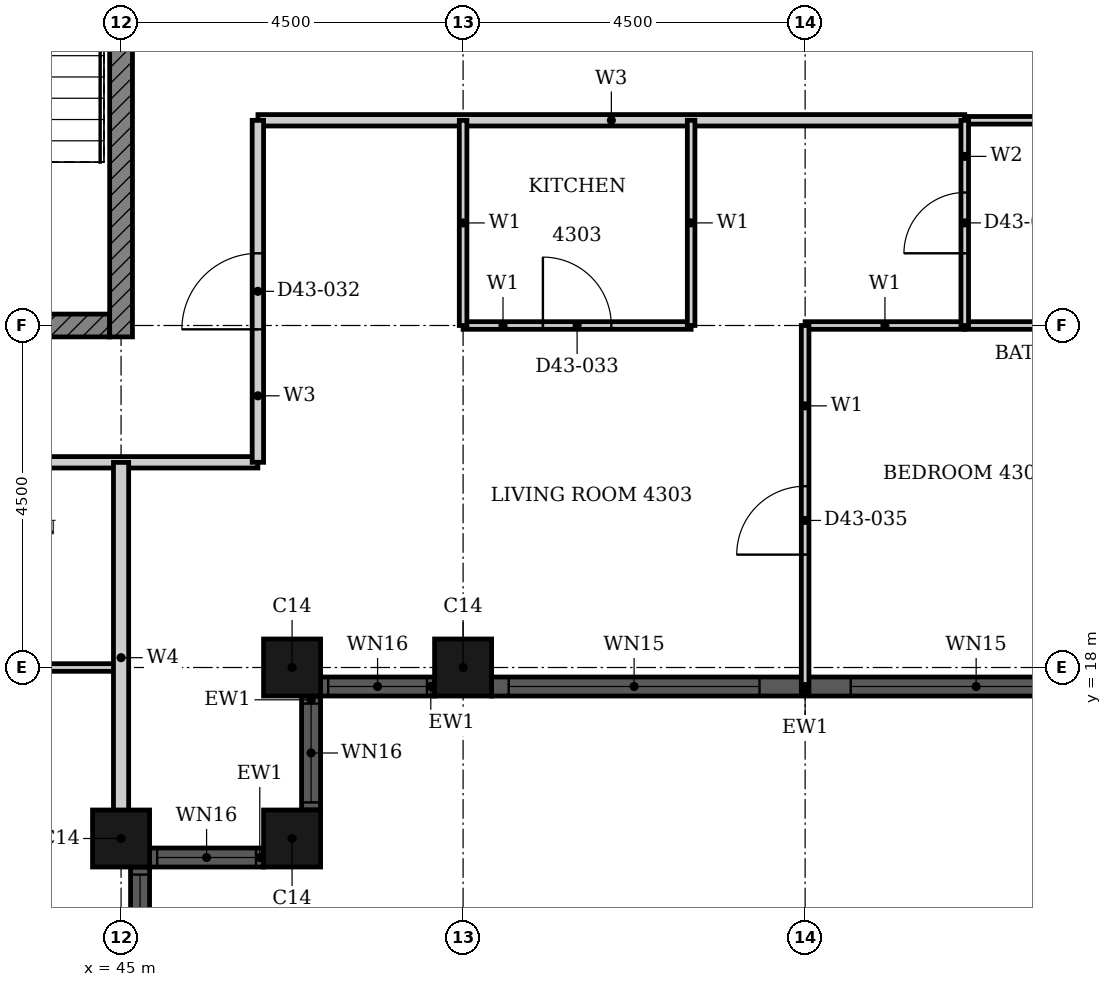
"""IFC4 building model, lengths in metres.
Left out: names, types, materials, properties, quantities, classifications, styles, units other than length and angle.
Written with IfcOpenShell. Run it as: python <this file> out.ifc"""

import sys

from ifc_helpers import new_model, si_unit, direction, frame, frame_2d, origin, origin_2d, place, context, subcontext, project, spatial, rectangle, hollow_rectangle, extrude, element, fill, save


model = new_model("IFC4")
c1 = context("Model", 3, precision=1e-05, world=origin(), true_north=direction((0.0, 1.0)))
c2 = subcontext(c1, "Body", "Model", "MODEL_VIEW")
j1 = project(units=[si_unit("LENGTHUNIT", "METRE"), si_unit("PLANEANGLEUNIT", "RADIAN")], contexts=[c1])
p1 = place(None, origin())
s1 = spatial("IfcSite", under=j1, at=p1, CompositionType="ELEMENT")
p2 = place(p1, origin())
s2 = spatial("IfcBuilding", under=s1, at=p2, CompositionType="ELEMENT")
p3 = place(p2, frame((0.0, 0.0, 172.8)))
s3 = spatial("IfcBuildingStorey", under=s2, at=p3, CompositionType="ELEMENT", Elevation=172.8)
for number, where, z_axis, x_axis in (
    (1, (45.0, 15.75, 0.0), (0.0, 0.0, 1.0), (1.0, 0.0, 0.0)),
    (2, (47.25, 15.75, 0.0), (0.0, 0.0, 1.0), (1.0, 0.0, 0.0)),
    (3, (47.25, 18.0, 0.0), (0.0, 0.0, 1.0), (1.0, 0.0, 0.0)),
    (4, (49.5, 18.0, 0.0), (0.0, 0.0, 1.0), (1.0, 0.0, 0.0)),
):
    element("IfcColumn", number, at=place(p3, frame(where, z_axis=z_axis, x_axis=x_axis)), inside=s3, PredefinedType="COLUMN", context=c2, shape_type="SweptSolid", body=[
        extrude(hollow_rectangle(XDim=0.75, YDim=0.75, WallThickness=0.024, at=origin_2d()), origin(), (0.0, 0.0, 1.0), 3.7),
    ])
p4 = place(p3, frame((45.25, 13.875, 0.0), z_axis=(0.0, 0.0, 1.0), x_axis=(0.0, 1.0, 0.0)))
e5 = element("IfcWall", 5, at=p4, inside=s3, PredefinedType="SOLIDWALL", context=c2, shape_type="SweptSolid", body=[
    extrude(rectangle(XDim=1.5, YDim=0.25, at=frame_2d((0.75, 0.0))), origin(), (0.0, 0.0, 1.0), 3.7),
])
p5 = place(p4, frame((0.1, 0.0, 0.9)))
e6 = element("IfcOpeningElement", 6, at=p5, cuts=e5, PredefinedType="OPENING", context=c2, shape_type="SweptSolid", body=[
    extrude(rectangle(XDim=1.3, YDim=1.85, at=frame_2d((0.65, 0.925))), frame((0.0, 0.135, 0.0), z_axis=(0.0, -1.0, 0.0), x_axis=(1.0, 0.0, 0.0)), (0.0, 0.0, 1.0), 0.27),
])
p6 = place(p3, frame((45.375, 15.5, 0.0), z_axis=(0.0, 0.0, 1.0), x_axis=(1.0, 0.0, 0.0)))
e7 = element("IfcWall", 7, at=p6, inside=s3, PredefinedType="SOLIDWALL", context=c2, shape_type="SweptSolid", body=[
    extrude(rectangle(XDim=1.5, YDim=0.25, at=frame_2d((0.75, 0.0))), origin(), (0.0, 0.0, 1.0), 3.7),
])
p7 = place(p6, frame((0.1, 0.0, 0.9)))
e8 = element("IfcOpeningElement", 8, at=p7, cuts=e7, PredefinedType="OPENING", context=c2, shape_type="SweptSolid", body=[
    extrude(rectangle(XDim=1.3, YDim=1.85, at=frame_2d((0.65, 0.925))), frame((0.0, 0.135, 0.0), z_axis=(0.0, -1.0, 0.0), x_axis=(1.0, 0.0, 0.0)), (0.0, 0.0, 1.0), 0.27),
])
p8 = place(p3, frame((47.5, 16.125, 0.0), z_axis=(0.0, 0.0, 1.0), x_axis=(0.0, 1.0, 0.0)))
e9 = element("IfcWall", 9, at=p8, inside=s3, PredefinedType="SOLIDWALL", context=c2, shape_type="SweptSolid", body=[
    extrude(rectangle(XDim=1.5, YDim=0.25, at=frame_2d((0.75, 0.0))), origin(), (0.0, 0.0, 1.0), 3.7),
])
p9 = place(p8, frame((0.1, 0.0, 0.9)))
e10 = element("IfcOpeningElement", 10, at=p9, cuts=e9, PredefinedType="OPENING", context=c2, shape_type="SweptSolid", body=[
    extrude(rectangle(XDim=1.3, YDim=1.85, at=frame_2d((0.65, 0.925))), frame((0.0, 0.135, 0.0), z_axis=(0.0, -1.0, 0.0), x_axis=(1.0, 0.0, 0.0)), (0.0, 0.0, 1.0), 0.27),
])
p10 = place(p3, frame((47.625, 17.75, 0.0), z_axis=(0.0, 0.0, 1.0), x_axis=(1.0, 0.0, 0.0)))
e11 = element("IfcWall", 11, at=p10, inside=s3, PredefinedType="SOLIDWALL", context=c2, shape_type="SweptSolid", body=[
    extrude(rectangle(XDim=1.5, YDim=0.25, at=frame_2d((0.75, 0.0))), origin(), (0.0, 0.0, 1.0), 3.7),
])
p11 = place(p10, frame((0.1, 0.0, 0.9)))
e12 = element("IfcOpeningElement", 12, at=p11, cuts=e11, PredefinedType="OPENING", context=c2, shape_type="SweptSolid", body=[
    extrude(rectangle(XDim=1.3, YDim=1.85, at=frame_2d((0.65, 0.925))), frame((0.0, 0.135, 0.0), z_axis=(0.0, -1.0, 0.0), x_axis=(1.0, 0.0, 0.0)), (0.0, 0.0, 1.0), 0.27),
])
p12 = place(p3, frame((49.875, 17.75, 0.0), z_axis=(0.0, 0.0, 1.0), x_axis=(1.0, 0.0, 0.0)))
e13 = element("IfcWall", 13, at=p12, inside=s3, PredefinedType="SOLIDWALL", context=c2, shape_type="SweptSolid", body=[
    extrude(rectangle(XDim=8.25, YDim=0.25, at=frame_2d((4.125, 0.0))), origin(), (0.0, 0.0, 1.0), 3.7),
])
p13 = place(p12, frame((0.225, 0.0, 0.45)))
e14 = element("IfcOpeningElement", 14, at=p13, cuts=e13, PredefinedType="OPENING", context=c2, shape_type="SweptSolid", body=[
    extrude(rectangle(XDim=3.3, YDim=2.3, at=frame_2d((1.65, 1.15))), frame((0.0, 0.135, 0.0), z_axis=(0.0, -1.0, 0.0), x_axis=(1.0, 0.0, 0.0)), (0.0, 0.0, 1.0), 0.27),
])
p14 = place(p12, frame((4.725, 0.0, 0.45)))
e15 = element("IfcOpeningElement", 15, at=p14, cuts=e13, PredefinedType="OPENING", context=c2, shape_type="SweptSolid", body=[
    extrude(rectangle(XDim=3.3, YDim=2.3, at=frame_2d((1.65, 1.15))), frame((0.0, 0.135, 0.0), z_axis=(0.0, -1.0, 0.0), x_axis=(1.0, 0.0, 0.0)), (0.0, 0.0, 1.0), 0.27),
])
p15 = place(p3, frame((32.911, 22.5, 0.0), z_axis=(0.0, 0.0, 1.0), x_axis=(1.0, 0.0, 0.0)))
e16 = element("IfcWall", 16, at=p15, inside=s3, PredefinedType="SHEAR", context=c2, shape_type="SweptSolid", body=[
    extrude(rectangle(XDim=11.939, YDim=0.3, at=frame_2d((5.97, 0.0))), origin(), (0.0, 0.0, 1.0), 3.4),
])
p16 = place(p15, frame((5.404, 0.0, 0.0)))
e17 = element("IfcOpeningElement", 17, at=p16, cuts=e16, PredefinedType="OPENING", context=c2, shape_type="SweptSolid", body=[
    extrude(rectangle(XDim=1.8, YDim=2.1, at=frame_2d((0.9, 1.05))), frame((0.0, 0.16, 0.0), z_axis=(0.0, -1.0, 0.0), x_axis=(1.0, 0.0, 0.0)), (0.0, 0.0, 1.0), 0.32),
])
p17 = place(p3, frame((45.0, 22.35, 0.0), z_axis=(0.0, 0.0, 1.0), x_axis=(0.0, 1.0, 0.0)))
e18 = element("IfcWall", 18, at=p17, inside=s3, PredefinedType="SHEAR", context=c2, shape_type="SweptSolid", body=[
    extrude(rectangle(XDim=9.3, YDim=0.3, at=frame_2d((4.65, 0.0))), origin(), (0.0, 0.0, 1.0), 3.4),
])
p18 = place(p3, frame((38.4, 20.7, 0.0), z_axis=(0.0, 0.0, 1.0), x_axis=(1.0, 0.0, 0.0)))
e19 = element("IfcWall", 19, at=p18, inside=s3, PredefinedType="PARTITIONING", context=c2, shape_type="SweptSolid", body=[
    extrude(rectangle(XDim=8.4, YDim=0.15, at=frame_2d((4.2, 0.0))), origin(), (0.0, 0.0, 1.0), 3.4),
])
p19 = place(p3, frame((46.801, 25.2, 0.0), z_axis=(0.0, 0.0, 1.0), x_axis=(1.0, 0.0, 0.0)))
e20 = element("IfcWall", 20, at=p19, inside=s3, PredefinedType="PARTITIONING", context=c2, shape_type="SweptSolid", body=[
    extrude(rectangle(XDim=9.299, YDim=0.15, at=frame_2d((4.649, 0.0))), origin(), (0.0, 0.0, 1.0), 3.4),
])
p20 = place(p3, frame((46.8, 20.7, 0.0), z_axis=(0.0, 0.0, 1.0), x_axis=(0.0, 1.0, 0.0)))
e21 = element("IfcWall", 21, at=p20, inside=s3, PredefinedType="PARTITIONING", context=c2, shape_type="SweptSolid", body=[
    extrude(rectangle(XDim=4.499, YDim=0.15, at=frame_2d((2.25, 0.0))), origin(), (0.0, 0.0, 1.0), 3.4),
])
p21 = place(p20, frame((1.75, 0.0, 0.0)))
e22 = element("IfcOpeningElement", 22, at=p21, cuts=e21, PredefinedType="OPENING", context=c2, shape_type="SweptSolid", body=[
    extrude(rectangle(XDim=1.0, YDim=2.2, at=frame_2d((0.5, 1.1))), frame((0.0, 0.085, 0.0), z_axis=(0.0, -1.0, 0.0), x_axis=(1.0, 0.0, 0.0)), (0.0, 0.0, 1.0), 0.17),
])
p22 = place(p3, frame((42.0, 18.0, 0.0), z_axis=(0.0, 0.0, 1.0), x_axis=(1.0, 0.0, 0.0)))
e23 = element("IfcWall", 23, at=p22, inside=s3, PredefinedType="PARTITIONING", context=c2, shape_type="SweptSolid", body=[
    extrude(rectangle(XDim=3.0, YDim=0.1, at=frame_2d((1.5, 0.0))), origin(), (0.0, 0.0, 1.0), 3.4),
])
p23 = place(p22, frame((1.05, 0.0, 0.0)))
e24 = element("IfcOpeningElement", 24, at=p23, cuts=e23, PredefinedType="OPENING", context=c2, shape_type="SweptSolid", body=[
    extrude(rectangle(XDim=0.9, YDim=2.1, at=frame_2d((0.45, 1.05))), frame((0.0, 0.06, 0.0), z_axis=(0.0, -1.0, 0.0), x_axis=(1.0, 0.0, 0.0)), (0.0, 0.0, 1.0), 0.12),
])
p24 = place(p3, frame((54.0, 22.5, 0.0), z_axis=(0.0, 0.0, 1.0), x_axis=(1.0, 0.0, 0.0)))
e25 = element("IfcWall", 25, at=p24, inside=s3, PredefinedType="PARTITIONING", context=c2, shape_type="SweptSolid", body=[
    extrude(rectangle(XDim=2.1, YDim=0.1, at=frame_2d((1.05, 0.0))), origin(), (0.0, 0.0, 1.0), 2.68),
])
p25 = place(p3, frame((49.5, 22.5, 0.0), z_axis=(0.0, 0.0, 1.0), x_axis=(1.0, 0.0, 0.0)))
e26 = element("IfcWall", 26, at=p25, inside=s3, PredefinedType="PARTITIONING", context=c2, shape_type="SweptSolid", body=[
    extrude(rectangle(XDim=3.0, YDim=0.1, at=frame_2d((1.5, 0.0))), origin(), (0.0, 0.0, 1.0), 2.68),
])
p26 = place(p25, frame((1.05, 0.0, 0.0)))
e27 = element("IfcOpeningElement", 27, at=p26, cuts=e26, PredefinedType="OPENING", context=c2, shape_type="SweptSolid", body=[
    extrude(rectangle(XDim=0.9, YDim=2.1, at=frame_2d((0.45, 1.05))), frame((0.0, 0.06, 0.0), z_axis=(0.0, -1.0, 0.0), x_axis=(1.0, 0.0, 0.0)), (0.0, 0.0, 1.0), 0.12),
])
p27 = place(p3, frame((49.5, 22.5, 0.0), z_axis=(0.0, 0.0, 1.0), x_axis=(0.0, 1.0, 0.0)))
e28 = element("IfcWall", 28, at=p27, inside=s3, PredefinedType="PARTITIONING", context=c2, shape_type="SweptSolid", body=[
    extrude(rectangle(XDim=2.699, YDim=0.1, at=frame_2d((1.35, 0.0))), origin(), (0.0, 0.0, 1.0), 2.48),
])
p28 = place(p3, frame((52.5, 22.5, 0.0), z_axis=(0.0, 0.0, 1.0), x_axis=(0.0, 1.0, 0.0)))
e29 = element("IfcWall", 29, at=p28, inside=s3, PredefinedType="PARTITIONING", context=c2, shape_type="SweptSolid", body=[
    extrude(rectangle(XDim=2.7, YDim=0.1, at=frame_2d((1.35, 0.0))), origin(), (0.0, 0.0, 1.0), 3.4),
])
p29 = place(p3, frame((54.0, 17.685, 0.0), z_axis=(0.0, 0.0, 1.0), x_axis=(0.0, 1.0, 0.0)))
e30 = element("IfcWall", 30, at=p29, inside=s3, PredefinedType="PARTITIONING", context=c2, shape_type="SweptSolid", body=[
    extrude(rectangle(XDim=4.815, YDim=0.1, at=frame_2d((2.407, 0.0))), origin(), (0.0, 0.0, 1.0), 3.4),
])
p30 = place(p29, frame((1.8, 0.0, 0.0)))
e31 = element("IfcOpeningElement", 31, at=p30, cuts=e30, PredefinedType="OPENING", context=c2, shape_type="SweptSolid", body=[
    extrude(rectangle(XDim=0.9, YDim=2.1, at=frame_2d((0.45, 1.05))), frame((0.0, 0.06, 0.0), z_axis=(0.0, -1.0, 0.0), x_axis=(1.0, 0.0, 0.0)), (0.0, 0.0, 1.0), 0.12),
])
p31 = place(p3, frame((45.0, 15.56, 0.0), z_axis=(0.0, 0.0, 1.0), x_axis=(0.0, 1.0, 0.0)))
e32 = element("IfcWall", 32, at=p31, inside=s3, PredefinedType="PARTITIONING", context=c2, shape_type="SweptSolid", body=[
    extrude(rectangle(XDim=5.139, YDim=0.2, at=frame_2d((2.569, 0.0))), origin(), (0.0, 0.0, 1.0), 3.4),
])
p32 = place(p3, frame((56.1, 22.5, 0.0), z_axis=(0.0, 0.0, 1.0), x_axis=(1.0, 0.0, 0.0)))
e33 = element("IfcWall", 33, at=p32, inside=s3, PredefinedType="PARTITIONING", context=c2, shape_type="SweptSolid", body=[
    extrude(rectangle(XDim=2.4, YDim=0.1, at=frame_2d((1.2, 0.0))), origin(), (0.0, 0.0, 1.0), 2.68),
])
p33 = place(p3, frame((56.1, 25.2, 0.0), z_axis=(0.0, 0.0, 1.0), x_axis=(1.0, 0.0, 0.0)))
e34 = element("IfcWall", 34, at=p33, inside=s3, PredefinedType="PARTITIONING", context=c2, shape_type="SweptSolid", body=[
    extrude(rectangle(XDim=2.4, YDim=0.1, at=frame_2d((1.2, 0.0))), origin(), (0.0, 0.0, 1.0), 3.4),
])
p34 = place(p3, frame((56.1, 22.5, 0.0), z_axis=(0.0, 0.0, 1.0), x_axis=(0.0, 1.0, 0.0)))
e35 = element("IfcWall", 35, at=p34, inside=s3, PredefinedType="PARTITIONING", context=c2, shape_type="SweptSolid", body=[
    extrude(rectangle(XDim=2.7, YDim=0.1, at=frame_2d((1.35, 0.0))), origin(), (0.0, 0.0, 1.0), 3.4),
])
p35 = place(p34, frame((0.95, 0.0, 0.0)))
e36 = element("IfcOpeningElement", 36, at=p35, cuts=e35, PredefinedType="OPENING", context=c2, shape_type="SweptSolid", body=[
    extrude(rectangle(XDim=0.8, YDim=2.1, at=frame_2d((0.4, 1.05))), frame((0.0, 0.06, 0.0), z_axis=(0.0, -1.0, 0.0), x_axis=(1.0, 0.0, 0.0)), (0.0, 0.0, 1.0), 0.12),
])
p36 = place(p5, origin())
e37 = element("IfcWindow", 37, at=p36, inside=s3, PartitioningType="SINGLE_PANEL", PredefinedType="WINDOW", context=c2, shape_type="SweptSolid", body=[
    extrude(rectangle(XDim=1.3, YDim=1.85, at=frame_2d((0.65, 0.925))), frame((0.0, 0.03, 0.0), z_axis=(0.0, -1.0, 0.0), x_axis=(1.0, 0.0, 0.0)), (0.0, 0.0, 1.0), 0.06),
])
fill(e6, e37)
p37 = place(p7, origin())
e38 = element("IfcWindow", 38, at=p37, inside=s3, PartitioningType="SINGLE_PANEL", PredefinedType="WINDOW", context=c2, shape_type="SweptSolid", body=[
    extrude(rectangle(XDim=1.3, YDim=1.85, at=frame_2d((0.65, 0.925))), frame((0.0, 0.03, 0.0), z_axis=(0.0, -1.0, 0.0), x_axis=(1.0, 0.0, 0.0)), (0.0, 0.0, 1.0), 0.06),
])
fill(e8, e38)
p38 = place(p9, origin())
e39 = element("IfcWindow", 39, at=p38, inside=s3, PartitioningType="SINGLE_PANEL", PredefinedType="WINDOW", context=c2, shape_type="SweptSolid", body=[
    extrude(rectangle(XDim=1.3, YDim=1.85, at=frame_2d((0.65, 0.925))), frame((0.0, 0.03, 0.0), z_axis=(0.0, -1.0, 0.0), x_axis=(1.0, 0.0, 0.0)), (0.0, 0.0, 1.0), 0.06),
])
fill(e10, e39)
p39 = place(p11, origin())
e40 = element("IfcWindow", 40, at=p39, inside=s3, PartitioningType="SINGLE_PANEL", PredefinedType="WINDOW", context=c2, shape_type="SweptSolid", body=[
    extrude(rectangle(XDim=1.3, YDim=1.85, at=frame_2d((0.65, 0.925))), frame((0.0, 0.03, 0.0), z_axis=(0.0, -1.0, 0.0), x_axis=(1.0, 0.0, 0.0)), (0.0, 0.0, 1.0), 0.06),
])
fill(e12, e40)
p40 = place(p13, origin())
e41 = element("IfcWindow", 41, at=p40, inside=s3, PartitioningType="SINGLE_PANEL", PredefinedType="WINDOW", context=c2, shape_type="SweptSolid", body=[
    extrude(rectangle(XDim=3.3, YDim=2.3, at=frame_2d((1.65, 1.15))), frame((0.0, 0.03, 0.0), z_axis=(0.0, -1.0, 0.0), x_axis=(1.0, 0.0, 0.0)), (0.0, 0.0, 1.0), 0.06),
])
fill(e14, e41)
p41 = place(p14, origin())
e42 = element("IfcWindow", 42, at=p41, inside=s3, PartitioningType="SINGLE_PANEL", PredefinedType="WINDOW", context=c2, shape_type="SweptSolid", body=[
    extrude(rectangle(XDim=3.3, YDim=2.3, at=frame_2d((1.65, 1.15))), frame((0.0, 0.03, 0.0), z_axis=(0.0, -1.0, 0.0), x_axis=(1.0, 0.0, 0.0)), (0.0, 0.0, 1.0), 0.06),
])
fill(e15, e42)
p42 = place(p21, origin())
e43 = element("IfcDoor", 43, at=p42, inside=s3, OperationType="SINGLE_SWING_RIGHT", PredefinedType="DOOR", context=c2, shape_type="SweptSolid", body=[
    extrude(rectangle(XDim=1.0, YDim=2.2, at=frame_2d((0.5, 1.1))), frame((0.0, 0.025, 0.0), z_axis=(0.0, -1.0, 0.0), x_axis=(1.0, 0.0, 0.0)), (0.0, 0.0, 1.0), 0.05),
])
fill(e22, e43)
p43 = place(p26, origin())
e44 = element("IfcDoor", 44, at=p43, inside=s3, OperationType="SINGLE_SWING_RIGHT", PredefinedType="DOOR", context=c2, shape_type="SweptSolid", body=[
    extrude(rectangle(XDim=0.9, YDim=2.1, at=frame_2d((0.45, 1.05))), frame((0.0, 0.025, 0.0), z_axis=(0.0, -1.0, 0.0), x_axis=(1.0, 0.0, 0.0)), (0.0, 0.0, 1.0), 0.05),
])
fill(e27, e44)
p44 = place(p35, origin())
e45 = element("IfcDoor", 45, at=p44, inside=s3, OperationType="SINGLE_SWING_RIGHT", PredefinedType="DOOR", context=c2, shape_type="SweptSolid", body=[
    extrude(rectangle(XDim=0.8, YDim=2.1, at=frame_2d((0.4, 1.05))), frame((0.0, 0.025, 0.0), z_axis=(0.0, -1.0, 0.0), x_axis=(1.0, 0.0, 0.0)), (0.0, 0.0, 1.0), 0.05),
])
fill(e36, e45)
p45 = place(p30, origin())
e46 = element("IfcDoor", 46, at=p45, inside=s3, OperationType="SINGLE_SWING_RIGHT", PredefinedType="DOOR", context=c2, shape_type="SweptSolid", body=[
    extrude(rectangle(XDim=0.9, YDim=2.1, at=frame_2d((0.45, 1.05))), frame((0.0, 0.025, 0.0), z_axis=(0.0, -1.0, 0.0), x_axis=(1.0, 0.0, 0.0)), (0.0, 0.0, 1.0), 0.05),
])
fill(e31, e46)
save(model, sys.argv[1])
